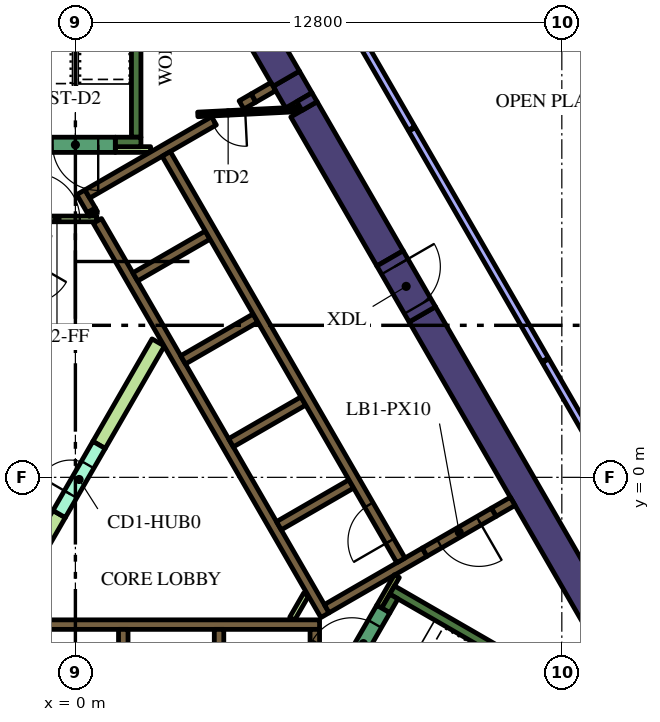
"""IFC4 building model, lengths in metres.
Left out: names, types, materials, properties, quantities, classifications, styles, units other than length and angle.
Written with IfcOpenShell. Run it as: python <this file> out.ifc"""

import sys

from ifc_helpers import new_model, si_unit, direction, frame, frame_2d, origin, place, context, subcontext, project, spatial, polyline, rectangle, outline, extrude, element, fill, save


model = new_model("IFC4")
c1 = context("Model", 3, precision=1e-05, world=origin(), true_north=direction((0.0, 1.0)))
c2 = subcontext(c1, "Body", "Model", "MODEL_VIEW")
j1 = project(units=[si_unit("LENGTHUNIT", "METRE"), si_unit("PLANEANGLEUNIT", "RADIAN")], contexts=[c1])
p1 = place(None, origin())
s1 = spatial("IfcSite", under=j1, at=p1, CompositionType="ELEMENT")
p2 = place(p1, origin())
s2 = spatial("IfcBuilding", under=s1, at=p2, CompositionType="ELEMENT")
p3 = place(p2, frame((0.0, 0.0, 187.8)))
s3 = spatial("IfcBuildingStorey", under=s2, at=p3, CompositionType="ELEMENT", Elevation=187.8)
p4 = place(p3, frame((9.129, 4.289, 0.0), z_axis=(0.0, 0.0, 1.0), x_axis=(0.499995742806, -0.866027861663, 0.0)))
e1 = element("IfcWall", 1, at=p4, inside=s3, PredefinedType="SOLIDWALL", context=c2, shape_type="SweptSolid", body=[
    extrude(rectangle(XDim=12.527, YDim=0.8, at=frame_2d((6.264, 0.0))), origin(), (0.0, 0.0, 1.0), 4.2),
])
p5 = place(p3, frame((5.878, 9.918, 0.0), z_axis=(0.0, 0.0, 1.0), x_axis=(-0.499893918903, 0.866086641072, 0.0)))
e2 = element("IfcWall", 2, at=p5, inside=s3, PredefinedType="SOLIDWALL", context=c2, shape_type="SweptSolid", body=[
    extrude(rectangle(XDim=0.657, YDim=0.8, at=frame_2d((0.329, 0.0))), origin(), (0.0, 0.0, 1.0), 4.2),
])
p6 = place(p3, frame((8.279, 5.761, 0.0), z_axis=(0.0, 0.0, 1.0), x_axis=(-0.500024261398, 0.866011396007, 0.0)))
e3 = element("IfcWall", 3, at=p6, inside=s3, PredefinedType="SOLIDWALL", context=c2, shape_type="SweptSolid", body=[
    extrude(rectangle(XDim=4.528, YDim=0.8, at=frame_2d((2.264, 0.0))), origin(), (0.0, 0.0, 1.0), 4.2),
])
p7 = place(p3, origin())
e4 = element("IfcWall", 4, at=p7, inside=s3, PredefinedType="SOLIDWALL", context=c2, shape_type="SweptSolid", body=[
    extrude(outline(polyline([(5.961, 9.654), (5.827, 9.886), (6.226, 10.116), (6.36, 9.884), (5.961, 9.654)])), origin(), (0.0, 0.0, 1.0), 4.2),
])
p8 = place(p3, frame((5.549, 10.489, 0.0), z_axis=(0.0, 0.0, 1.0), x_axis=(-0.50001746176, 0.866015321998, 0.0)))
e5 = element("IfcWall", 5, at=p8, inside=s3, PredefinedType="SOLIDWALL", context=c2, shape_type="SweptSolid", body=[
    extrude(rectangle(XDim=7.068, YDim=0.8, at=frame_2d((3.534, 0.0))), origin(), (0.0, 0.0, 1.0), 4.2),
])
p9 = place(p3, frame((8.334, -2.964, 0.0), z_axis=(0.0, 0.0, 1.0), x_axis=(0.866016039709, -0.500016218704, 0.0)))
e6 = element("IfcWall", 6, at=p9, inside=s3, PredefinedType="SOLIDWALL", context=c2, shape_type="SweptSolid", body=[
    extrude(rectangle(XDim=7.05, YDim=0.25, at=frame_2d((3.525, 0.0))), origin(), (0.0, 0.0, 1.0), 4.2),
])
p10 = place(p3, frame((8.168, -3.503, 0.0), z_axis=(0.0, 0.0, 1.0), x_axis=(0.49972245349, 0.866185586049, 0.0)))
e7 = element("IfcWall", 7, at=p10, inside=s3, PredefinedType="SOLIDWALL", context=c2, shape_type="SweptSolid", body=[
    extrude(rectangle(XDim=0.425, YDim=0.25, at=frame_2d((0.212, 0.0))), origin(), (0.0, 0.0, 1.0), 4.2),
])
p11 = place(p3, frame((1.6, 8.95, 0.0), z_axis=(0.0, 0.0, 1.0), x_axis=(0.0, 1.0, 0.0)))
e8 = element("IfcWall", 8, at=p11, inside=s3, PredefinedType="SOLIDWALL", context=c2, shape_type="SweptSolid", body=[
    extrude(rectangle(XDim=6.8, YDim=0.25, at=frame_2d((3.4, 0.0))), origin(), (0.0, 0.0, 1.0), 4.2),
])
p12 = place(p3, frame((1.05, 8.825, 0.0), z_axis=(0.0, 0.0, 1.0), x_axis=(1.0, 0.0, 0.0)))
e9 = element("IfcWall", 9, at=p12, inside=s3, PredefinedType="SOLIDWALL", context=c2, shape_type="SweptSolid", body=[
    extrude(rectangle(XDim=0.675, YDim=0.25, at=frame_2d((0.337, 0.0))), origin(), (0.0, 0.0, 1.0), 4.2),
])
p13 = place(p3, frame((-5.545, -3.875, 0.0), z_axis=(0.0, 0.0, 1.0), x_axis=(1.0, 0.0, 0.0)))
e10 = element("IfcWall", 10, at=p13, inside=s3, PredefinedType="SOLIDWALL", context=c2, shape_type="SweptSolid", body=[
    extrude(rectangle(XDim=11.97, YDim=0.25, at=frame_2d((5.985, 0.0))), origin(), (0.0, 0.0, 1.0), 4.2),
])
p14 = place(p3, frame((6.3, -7.24, 0.0), z_axis=(0.0, 0.0, 1.0), x_axis=(0.0, 1.0, 0.0)))
e11 = element("IfcWall", 11, at=p14, inside=s3, PredefinedType="SOLIDWALL", context=c2, shape_type="SweptSolid", body=[
    extrude(rectangle(XDim=3.24, YDim=0.25, at=frame_2d((1.62, 0.0))), origin(), (0.0, 0.0, 1.0), 4.2),
])
for number, where, z_axis, x_axis in (
    (12, (3.78, -4.0, 0.0), (0.0, 0.0, 1.0), (0.0, -1.0, 0.0)),
    (13, (1.26, -4.0, 0.0), (0.0, 0.0, 1.0), (0.0, -1.0, 0.0)),
):
    element("IfcWall", number, at=place(p3, frame(where, z_axis=z_axis, x_axis=x_axis)), inside=s3, PredefinedType="SOLIDWALL", context=c2, shape_type="SweptSolid", body=[
        extrude(rectangle(XDim=2.2, YDim=0.25, at=frame_2d((1.1, 0.0))), origin(), (0.0, 0.0, 1.0), 4.2),
    ])
p15 = place(p3, frame((11.507, -0.631, 0.0), z_axis=(0.0, 0.0, 1.0), x_axis=(-0.866093731455, -0.499881634324, 0.0)))
e14 = element("IfcWall", 14, at=p15, inside=s3, PredefinedType="SOLIDWALL", context=c2, shape_type="SweptSolid", body=[
    extrude(rectangle(XDim=0.575, YDim=0.25, at=frame_2d((0.288, 0.0))), origin(), (0.0, 0.0, 1.0), 4.2),
])
p16 = place(p3, frame((0.473, 6.93, 0.0), z_axis=(0.0, 0.0, 1.0), x_axis=(-0.49972245349, 0.866185586049, 0.0)))
e15 = element("IfcWall", 15, at=p16, inside=s3, PredefinedType="SOLIDWALL", context=c2, shape_type="SweptSolid", body=[
    extrude(rectangle(XDim=0.11, YDim=0.25, at=frame_2d((0.055, 0.0))), origin(), (0.0, 0.0, 1.0), 4.2),
])
p17 = place(p3, frame((6.568, -3.627, 0.0), z_axis=(0.0, 0.0, 1.0), x_axis=(-0.499999455981, 0.866025717874, 0.0)))
e16 = element("IfcWall", 16, at=p17, inside=s3, PredefinedType="SOLIDWALL", context=c2, shape_type="SweptSolid", body=[
    extrude(rectangle(XDim=11.978, YDim=0.25, at=frame_2d((5.989, 0.0))), origin(), (0.0, 0.0, 1.0), 4.2),
])
p18 = place(p3, frame((0.417, 7.027, 0.0), z_axis=(0.0, 0.0, 1.0), x_axis=(-0.500210807569, 0.865903659763, 0.0)))
e17 = element("IfcWall", 17, at=p18, inside=s3, PredefinedType="SOLIDWALL", context=c2, shape_type="SweptSolid", body=[
    extrude(rectangle(XDim=0.548, YDim=0.25, at=frame_2d((0.274, 0.0))), origin(), (0.0, 0.0, 1.0), 4.2),
])
p19 = place(p3, frame((3.647, 9.38, 0.0), z_axis=(0.0, 0.0, 1.0), x_axis=(-0.866025015791, -0.500000672024, 0.0)))
e18 = element("IfcWall", 18, at=p19, inside=s3, PredefinedType="SOLIDWALL", context=c2, shape_type="SweptSolid", body=[
    extrude(rectangle(XDim=3.849, YDim=0.25, at=frame_2d((1.924, 0.0))), origin(), (0.0, 0.0, 1.0), 4.2),
])
p20 = place(p3, frame((1.574, 5.274, 0.0), z_axis=(0.0, 0.0, 1.0), x_axis=(0.866028486751, 0.499994660107, 0.0)))
e19 = element("IfcWall", 19, at=p20, inside=s3, PredefinedType="SOLIDWALL", context=c2, shape_type="SweptSolid", body=[
    extrude(rectangle(XDim=2.2, YDim=0.25, at=frame_2d((1.1, 0.0))), origin(), (0.0, 0.0, 1.0), 4.2),
])
for number, where, z_axis, x_axis in (
    (20, (2.834, 3.091, 0.0), (0.0, 0.0, 1.0), (0.866, 0.5, 0.0)),
    (21, (4.094, 0.909, 0.0), (0.0, 0.0, 1.0), (0.866, 0.5, 0.0)),
    (22, (5.354, -1.274, 0.0), (0.0, 0.0, 1.0), (0.866, 0.5, 0.0)),
):
    element("IfcWall", number, at=place(p3, frame(where, z_axis=z_axis, x_axis=x_axis)), inside=s3, PredefinedType="SOLIDWALL", context=c2, shape_type="SweptSolid", body=[
        extrude(rectangle(XDim=2.2, YDim=0.25, at=frame_2d((1.1, 0.0))), origin(), (0.0, 0.0, 1.0), 4.2),
    ])
p21 = place(p3, frame((6.614, -3.456, 0.0), z_axis=(0.0, 0.0, 1.0), x_axis=(0.866032512851, 0.499987686533, 0.0)))
e23 = element("IfcWall", 23, at=p21, inside=s3, PredefinedType="SOLIDWALL", context=c2, shape_type="SweptSolid", body=[
    extrude(rectangle(XDim=2.975, YDim=0.25, at=frame_2d((1.487, 0.0))), origin(), (0.0, 0.0, 1.0), 4.2),
])
p22 = place(p3, frame((4.688, 9.981, 0.0), z_axis=(0.0, 0.0, 1.0), x_axis=(-0.865974312977, -0.500088481434, 0.0)))
e24 = element("IfcWall", 24, at=p22, inside=s3, PredefinedType="SOLIDWALL", context=c2, shape_type="SweptSolid", body=[
    extrude(rectangle(XDim=0.366, YDim=0.25, at=frame_2d((0.183, 0.0))), origin(), (0.0, 0.0, 1.0), 4.2),
])
p23 = place(p3, frame((4.689, 9.982, 0.0), z_axis=(0.0, 0.0, 1.0), x_axis=(0.865947592822, 0.500134748329, 0.0)))
e25 = element("IfcWall", 25, at=p23, inside=s3, PredefinedType="SOLIDWALL", context=c2, shape_type="SweptSolid", body=[
    extrude(rectangle(XDim=0.598, YDim=0.25, at=frame_2d((0.299, 0.0))), origin(), (0.0, 0.0, 1.0), 4.2),
])
p24 = place(p3, frame((1.05, 8.625, 0.0), z_axis=(0.0, 0.0, 1.0), x_axis=(1.0, 0.0, 0.0)))
e26 = element("IfcWall", 26, at=p24, inside=s3, PredefinedType="PARTITIONING", context=c2, shape_type="SweptSolid", body=[
    extrude(rectangle(XDim=0.929, YDim=0.15, at=frame_2d((0.464, 0.0))), origin(), (0.0, 0.0, 1.0), 3.15),
])
p25 = place(p3, frame((8.459, -2.599, 0.0), z_axis=(0.0, 0.0, 1.0), x_axis=(-0.500041054325, -0.866001699761, 0.0)))
e27 = element("IfcWall", 27, at=p25, inside=s3, PredefinedType="PARTITIONING", context=c2, shape_type="SweptSolid", body=[
    extrude(rectangle(XDim=0.929, YDim=0.15, at=frame_2d((0.464, 0.0))), origin(), (0.0, 0.0, 1.0), 4.2),
])
p26 = place(p3, frame((5.705, -3.718, 0.0), z_axis=(0.0, 0.0, 1.0), x_axis=(0.499962090823, 0.866047289552, 0.0)))
e28 = element("IfcWall", 28, at=p26, inside=s3, PredefinedType="PARTITIONING", context=c2, shape_type="SweptSolid", body=[
    extrude(rectangle(XDim=0.735, YDim=0.15, at=frame_2d((0.367, 0.0))), origin(), (0.0, 0.0, 1.0), 3.15),
])
e29 = element("IfcWall", 29, at=p7, inside=s3, PredefinedType="PARTITIONING", context=c2, shape_type="SweptSolid", body=[
    extrude(outline(polyline([(2.017, 3.643), (2.342, 3.456), (0.785, 0.76), (0.46, 0.947), (2.017, 3.643)])), origin(), (0.0, 0.0, 1.0), 3.15),
])
e30 = element("IfcWall", 30, at=p7, inside=s3, PredefinedType="PARTITIONING", context=c2, shape_type="SweptSolid", body=[
    extrude(outline(polyline([(-0.59, -0.872), (-0.265, -1.059), (-1.822, -3.756), (-2.147, -3.568), (-0.59, -0.872)])), origin(), (0.0, 0.0, 1.0), 3.15),
])
p27 = place(p3, frame((8.565, -2.185, 0.0), z_axis=(0.0, 0.0, 1.0), x_axis=(-0.499997954832, 0.866026584559, 0.0)))
e31 = element("IfcWall", 31, at=p27, inside=s3, PredefinedType="SOLIDWALL", context=c2, shape_type="SweptSolid", body=[
    extrude(rectangle(XDim=12.35, YDim=0.25, at=frame_2d((6.175, 0.0))), origin(), (0.0, 0.0, 1.0), 4.2),
])
p28 = place(p27, frame((0.585, 0.0, 0.0)))
e32 = element("IfcOpeningElement", 32, at=p28, cuts=e31, PredefinedType="OPENING", context=c2, shape_type="SweptSolid", body=[
    extrude(rectangle(XDim=1.1, YDim=2.1, at=frame_2d((0.55, 1.05))), frame((0.0, 0.135, 0.0), z_axis=(0.0, -1.0, 0.0), x_axis=(1.0, 0.0, 0.0)), (0.0, 0.0, 1.0), 0.27),
])
p29 = place(p3, frame((7.053, -5.284, 0.0), z_axis=(0.0, 0.0, 1.0), x_axis=(0.500078061341, 0.865980330357, 0.0)))
e33 = element("IfcWall", 33, at=p29, inside=s3, PredefinedType="SOLIDWALL", context=c2, shape_type="SweptSolid", body=[
    extrude(rectangle(XDim=2.1, YDim=0.4, at=frame_2d((1.05, 0.0))), origin(), (0.0, 0.0, 1.0), 4.2),
])
p30 = place(p29, frame((0.45, 0.0, 0.0)))
e34 = element("IfcOpeningElement", 34, at=p30, cuts=e33, PredefinedType="OPENING", context=c2, shape_type="SweptSolid", body=[
    extrude(rectangle(XDim=1.2, YDim=2.1, at=frame_2d((0.6, 1.05))), frame((0.0, 0.21, 0.0), z_axis=(0.0, -1.0, 0.0), x_axis=(1.0, 0.0, 0.0)), (0.0, 0.0, 1.0), 0.42),
])
p31 = place(p3, frame((1.05, 8.75, 0.0), z_axis=(0.0, 0.0, 1.0), x_axis=(-1.0, 0.0, 0.0)))
e35 = element("IfcWall", 35, at=p31, inside=s3, PredefinedType="SOLIDWALL", context=c2, shape_type="SweptSolid", body=[
    extrude(rectangle(XDim=2.1, YDim=0.4, at=frame_2d((1.05, 0.0))), origin(), (0.0, 0.0, 1.0), 4.2),
])
p32 = place(p31, frame((0.45, 0.0, 0.0)))
e36 = element("IfcOpeningElement", 36, at=p32, cuts=e35, PredefinedType="OPENING", context=c2, shape_type="SweptSolid", body=[
    extrude(rectangle(XDim=1.2, YDim=2.1, at=frame_2d((0.6, 1.05))), frame((0.0, 0.21, 0.0), z_axis=(0.0, -1.0, 0.0), x_axis=(1.0, 0.0, 0.0)), (0.0, 0.0, 1.0), 0.42),
])
p33 = place(p3, frame((5.917, 9.684, 0.0), z_axis=(0.0, 0.0, 1.0), x_axis=(-0.998758194515, -0.049820366212, 0.0)))
e37 = element("IfcWall", 37, at=p33, inside=s3, PredefinedType="PARTITIONING", context=c2, shape_type="SweptSolid", body=[
    extrude(rectangle(XDim=2.7, YDim=0.12, at=frame_2d((1.35, 0.0))), origin(), (0.0, 0.0, 1.0), 3.15),
])
p34 = place(p33, frame((1.45, 0.0, 0.0)))
e38 = element("IfcOpeningElement", 38, at=p34, cuts=e37, PredefinedType="OPENING", context=c2, shape_type="SweptSolid", body=[
    extrude(rectangle(XDim=0.9, YDim=2.1, at=frame_2d((0.45, 1.05))), frame((0.0, 0.07, 0.0), z_axis=(0.0, -1.0, 0.0), x_axis=(1.0, 0.0, 0.0)), (0.0, 0.0, 1.0), 0.14),
])
p35 = place(p3, frame((-0.427, -0.966, 0.0), z_axis=(0.0, 0.0, 1.0), x_axis=(0.49994051562, 0.866059744384, 0.0)))
e39 = element("IfcWall", 39, at=p35, inside=s3, PredefinedType="PARTITIONING", context=c2, shape_type="SweptSolid", body=[
    extrude(rectangle(XDim=2.1, YDim=0.375, at=frame_2d((1.05, 0.0))), origin(), (0.0, 0.0, 1.0), 3.15),
])
p36 = place(p35, frame((0.6, 0.0, 0.0)))
e40 = element("IfcOpeningElement", 40, at=p36, cuts=e39, PredefinedType="OPENING", context=c2, shape_type="SweptSolid", body=[
    extrude(rectangle(XDim=0.9, YDim=2.1, at=frame_2d((0.45, 1.05))), frame((0.0, 0.198, 0.0), z_axis=(0.0, -1.0, 0.0), x_axis=(1.0, 0.0, 0.0)), (0.0, 0.0, 1.0), 0.395),
])
p37 = place(p3, frame((-1.534, 6.8, 0.0), z_axis=(0.0, 0.0, 1.0), x_axis=(1.0, 0.0, 0.0)))
e41 = element("IfcWall", 41, at=p37, inside=s3, PredefinedType="PARTITIONING", context=c2, shape_type="SweptSolid", body=[
    extrude(rectangle(XDim=2.1, YDim=0.15, at=frame_2d((1.05, 0.0))), origin(), (0.0, 0.0, 1.0), 3.15),
])
p38 = place(p37, frame((0.45, 0.0, 0.0)))
e42 = element("IfcOpeningElement", 42, at=p38, cuts=e41, PredefinedType="OPENING", context=c2, shape_type="SweptSolid", body=[
    extrude(rectangle(XDim=1.2, YDim=2.1, at=frame_2d((0.6, 1.05))), frame((0.0, 0.085, 0.0), z_axis=(0.0, -1.0, 0.0), x_axis=(1.0, 0.0, 0.0)), (0.0, 0.0, 1.0), 0.17),
])
p39 = place(p3, frame((11.009, -0.919, 0.0), z_axis=(0.0, 0.0, 1.0), x_axis=(-0.866059744384, -0.49994051562, 0.0)))
e43 = element("IfcWall", 43, at=p39, inside=s3, PredefinedType="SOLIDWALL", context=c2, shape_type="SweptSolid", body=[
    extrude(rectangle(XDim=2.1, YDim=0.25, at=frame_2d((1.05, 0.0))), origin(), (0.0, 0.0, 1.0), 4.2),
])
p40 = place(p39, frame((0.45, 0.0, 0.0)))
e44 = element("IfcOpeningElement", 44, at=p40, cuts=e43, PredefinedType="OPENING", context=c2, shape_type="SweptSolid", body=[
    extrude(rectangle(XDim=1.2, YDim=2.1, at=frame_2d((0.6, 1.05))), frame((0.0, 0.135, 0.0), z_axis=(0.0, -1.0, 0.0), x_axis=(1.0, 0.0, 0.0)), (0.0, 0.0, 1.0), 0.27),
])
p41 = place(p3, frame((8.279, 5.761, 0.0), z_axis=(0.0, 0.0, 1.0), x_axis=(0.500062241894, -0.865989465428, 0.0)))
e45 = element("IfcWall", 45, at=p41, inside=s3, PredefinedType="SOLIDWALL", context=c2, shape_type="SweptSolid", body=[
    extrude(rectangle(XDim=1.7, YDim=0.8, at=frame_2d((0.85, 0.0))), origin(), (0.0, 0.0, 1.0), 4.2),
])
p42 = place(p41, frame((0.25, 0.0, 0.0)))
e46 = element("IfcOpeningElement", 46, at=p42, cuts=e45, PredefinedType="OPENING", context=c2, shape_type="SweptSolid", body=[
    extrude(rectangle(XDim=1.2, YDim=2.1, at=frame_2d((0.6, 1.05))), frame((0.0, 0.41, 0.0), z_axis=(0.0, -1.0, 0.0), x_axis=(1.0, 0.0, 0.0)), (0.0, 0.0, 1.0), 0.82),
])
p43 = place(p3, frame((12.359, 3.094, 0.0), z_axis=(0.0, 0.0, 1.0), x_axis=(-0.500010275428, 0.866019471182, 0.0)))
e47 = element("IfcWall", 47, at=p43, inside=s3, PredefinedType="PARTITIONING", context=c2, shape_type="SweptSolid", body=[
    extrude(rectangle(XDim=7.0, YDim=0.2, at=frame_2d((3.5, 0.0))), origin(), (0.0, 0.0, 1.0), 3.15),
])
p44 = place(p3, frame((8.844, 9.182, 0.0), z_axis=(0.0, 0.0, 1.0), x_axis=(-0.50000000053, 0.866025403479, 0.0)))
e48 = element("IfcWall", 48, at=p44, inside=s3, PredefinedType="PARTITIONING", context=c2, shape_type="SweptSolid", body=[
    extrude(rectangle(XDim=9.188, YDim=0.2, at=frame_2d((4.594, 0.0))), origin(), (0.0, 0.0, 1.0), 3.15),
])
p45 = place(p44, frame((4.1, 0.0, 0.0)))
e49 = element("IfcOpeningElement", 49, at=p45, cuts=e48, PredefinedType="OPENING", context=c2, shape_type="SweptSolid", body=[
    extrude(rectangle(XDim=1.0, YDim=2.1, at=frame_2d((0.5, 1.05))), frame((0.0, 0.11, 0.0), z_axis=(0.0, -1.0, 0.0), x_axis=(1.0, 0.0, 0.0)), (0.0, 0.0, 1.0), 0.22),
])
p46 = place(p3, frame((13.765, 0.659, 0.0), z_axis=(0.0, 0.0, 1.0), x_axis=(-0.500046568876, 0.865998515562, 0.0)))
e50 = element("IfcWall", 50, at=p46, inside=s3, PredefinedType="PARTITIONING", context=c2, shape_type="SweptSolid", body=[
    extrude(rectangle(XDim=2.782, YDim=0.2, at=frame_2d((1.391, 0.0))), origin(), (0.0, 0.0, 1.0), 3.15),
])
p47 = place(p28, origin())
e51 = element("IfcDoor", 51, at=p47, inside=s3, OperationType="DOUBLE_DOOR_SLIDING", PredefinedType="DOOR", context=c2, shape_type="SweptSolid", body=[
    extrude(rectangle(XDim=1.1, YDim=2.1, at=frame_2d((0.55, 1.05))), frame((0.0, 0.025, 0.0), z_axis=(0.0, -1.0, 0.0), x_axis=(1.0, 0.0, 0.0)), (0.0, 0.0, 1.0), 0.05),
])
fill(e32, e51)
p48 = place(p30, origin())
e52 = element("IfcDoor", 52, at=p48, inside=s3, OperationType="SINGLE_SWING_LEFT", PredefinedType="DOOR", context=c2, shape_type="SweptSolid", body=[
    extrude(rectangle(XDim=1.2, YDim=2.1, at=frame_2d((0.6, 1.05))), frame((0.0, 0.025, 0.0), z_axis=(0.0, -1.0, 0.0), x_axis=(1.0, 0.0, 0.0)), (0.0, 0.0, 1.0), 0.05),
])
fill(e34, e52)
p49 = place(p32, origin())
e53 = element("IfcDoor", 53, at=p49, inside=s3, OperationType="SINGLE_SWING_LEFT", PredefinedType="DOOR", context=c2, shape_type="SweptSolid", body=[
    extrude(rectangle(XDim=1.2, YDim=2.1, at=frame_2d((0.6, 1.05))), frame((0.0, 0.025, 0.0), z_axis=(0.0, -1.0, 0.0), x_axis=(1.0, 0.0, 0.0)), (0.0, 0.0, 1.0), 0.05),
])
fill(e36, e53)
p50 = place(p34, origin())
e54 = element("IfcDoor", 54, at=p50, inside=s3, OperationType="SINGLE_SWING_LEFT", PredefinedType="DOOR", context=c2, shape_type="SweptSolid", body=[
    extrude(rectangle(XDim=0.9, YDim=2.1, at=frame_2d((0.45, 1.05))), frame((0.0, 0.025, 0.0), z_axis=(0.0, -1.0, 0.0), x_axis=(1.0, 0.0, 0.0)), (0.0, 0.0, 1.0), 0.05),
])
fill(e38, e54)
p51 = place(p36, origin())
e55 = element("IfcDoor", 55, at=p51, inside=s3, OperationType="SINGLE_SWING_LEFT", PredefinedType="DOOR", context=c2, shape_type="SweptSolid", body=[
    extrude(rectangle(XDim=0.9, YDim=2.1, at=frame_2d((0.45, 1.05))), frame((0.0, 0.025, 0.0), z_axis=(0.0, -1.0, 0.0), x_axis=(1.0, 0.0, 0.0)), (0.0, 0.0, 1.0), 0.05),
])
fill(e40, e55)
p52 = place(p38, origin())
e56 = element("IfcDoor", 56, at=p52, inside=s3, OperationType="SINGLE_SWING_LEFT", PredefinedType="DOOR", context=c2, shape_type="SweptSolid", body=[
    extrude(rectangle(XDim=1.2, YDim=2.1, at=frame_2d((0.6, 1.05))), frame((0.0, 0.025, 0.0), z_axis=(0.0, -1.0, 0.0), x_axis=(1.0, 0.0, 0.0)), (0.0, 0.0, 1.0), 0.05),
])
fill(e42, e56)
p53 = place(p40, origin())
e57 = element("IfcDoor", 57, at=p53, inside=s3, OperationType="SINGLE_SWING_LEFT", PredefinedType="DOOR", context=c2, shape_type="SweptSolid", body=[
    extrude(rectangle(XDim=1.2, YDim=2.1, at=frame_2d((0.6, 1.05))), frame((0.0, 0.025, 0.0), z_axis=(0.0, -1.0, 0.0), x_axis=(1.0, 0.0, 0.0)), (0.0, 0.0, 1.0), 0.05),
])
fill(e44, e57)
p54 = place(p42, origin())
e58 = element("IfcDoor", 58, at=p54, inside=s3, OperationType="SINGLE_SWING_LEFT", PredefinedType="DOOR", context=c2, shape_type="SweptSolid", body=[
    extrude(rectangle(XDim=1.2, YDim=2.1, at=frame_2d((0.6, 1.05))), frame((0.0, 0.025, 0.0), z_axis=(0.0, -1.0, 0.0), x_axis=(1.0, 0.0, 0.0)), (0.0, 0.0, 1.0), 0.05),
])
fill(e46, e58)
save(model, sys.argv[1])
